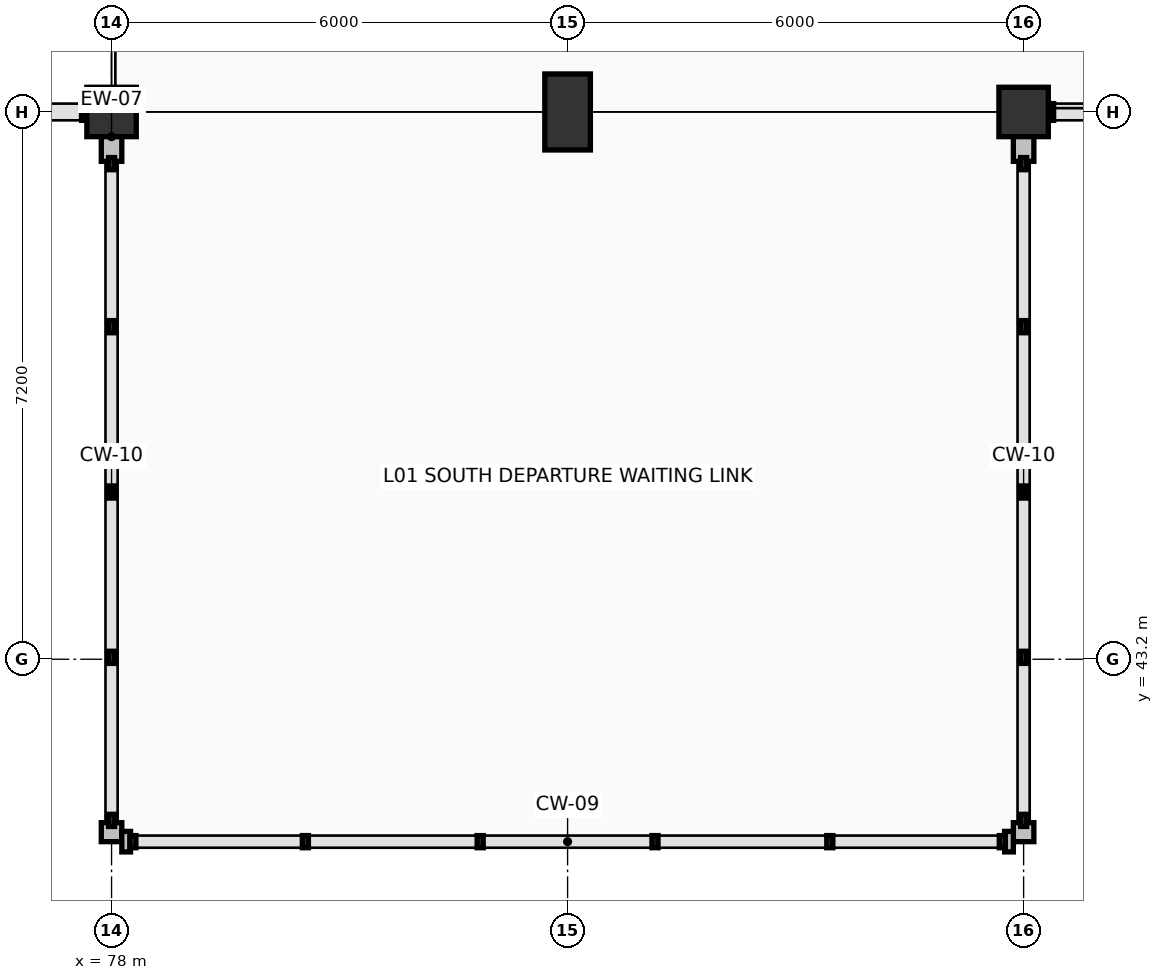
"""IFC4 building model, lengths in metres.
Left out: names, types, materials, properties, quantities, classifications, styles, units other than length and angle.
Written with IfcOpenShell. Run it as: python <this file> out.ifc"""

import sys

from ifc_helpers import new_model, si_unit, direction, frame, frame_2d, origin, origin_2d, place, context, subcontext, project, spatial, rectangle, extrude, element, save


model = new_model("IFC4")
c1 = context("Model", 3, precision=1e-05, world=origin(), true_north=direction((0.0, 1.0)))
c2 = subcontext(c1, "Body", "Model", "MODEL_VIEW")
j1 = project(units=[si_unit("LENGTHUNIT", "METRE"), si_unit("PLANEANGLEUNIT", "RADIAN")], contexts=[c1])
p1 = place(None, origin())
s1 = spatial("IfcSite", under=j1, at=p1, CompositionType="ELEMENT")
p2 = place(p1, origin())
s2 = spatial("IfcBuilding", under=s1, at=p2, CompositionType="ELEMENT")
p3 = place(p2, frame((0.0, 0.0, 5.76)))
s3 = spatial("IfcBuildingStorey", under=s2, at=p3, CompositionType="ELEMENT", Elevation=5.76)
p4 = place(p3, frame((78.0, 50.4, 0.0), z_axis=(0.0, 0.0, 1.0), x_axis=(1.0, 0.0, 0.0)))
e1 = element("IfcColumn", 1, at=p4, inside=s3, PredefinedType="COLUMN", context=c2, shape_type="SweptSolid", body=[
    extrude(rectangle(XDim=0.65, YDim=0.65, at=origin_2d()), origin(), (0.0, 0.0, 1.0), 5.08),
])
p5 = place(p3, frame((84.0, 50.4, 0.0), z_axis=(0.0, 0.0, 1.0), x_axis=(1.0, 0.0, 0.0)))
e2 = element("IfcColumn", 2, at=p5, inside=s3, PredefinedType="COLUMN", context=c2, shape_type="SweptSolid", body=[
    extrude(rectangle(XDim=0.6, YDim=1.0, at=origin_2d()), origin(), (0.0, 0.0, 1.0), 5.08),
])
p6 = place(p3, frame((90.0, 50.4, 0.0), z_axis=(0.0, 0.0, 1.0), x_axis=(1.0, 0.0, 0.0)))
e3 = element("IfcColumn", 3, at=p6, inside=s3, PredefinedType="COLUMN", context=c2, shape_type="SweptSolid", body=[
    extrude(rectangle(XDim=0.65, YDim=0.65, at=origin_2d()), origin(), (0.0, 0.0, 1.0), 5.08),
])
p7 = place(p3, frame((78.0, 49.75, 0.0), z_axis=(0.0, 0.0, 1.0), x_axis=(0.0, 1.0, 0.0)))
e4 = element("IfcWall", 4, at=p7, inside=s3, PredefinedType="SOLIDWALL", context=c2, shape_type="SweptSolid", body=[
    extrude(rectangle(XDim=0.65, YDim=0.27, at=frame_2d((0.325, 0.0))), origin(), (0.0, 0.0, 1.0), 3.44),
])
p8 = place(p3, frame((78.0, 40.8, 0.0), z_axis=(0.0, 0.0, 1.0), x_axis=(0.0, 1.0, 0.0)))
e5 = element("IfcWall", 5, at=p8, inside=s3, PredefinedType="SOLIDWALL", context=c2, shape_type="SweptSolid", body=[
    extrude(rectangle(XDim=0.25, YDim=0.27, at=frame_2d((0.125, 0.0))), origin(), (0.0, 0.0, 1.0), 3.44),
])
p9 = place(p3, frame((90.0, 49.75, 0.0), z_axis=(0.0, 0.0, 1.0), x_axis=(0.0, 1.0, 0.0)))
e6 = element("IfcWall", 6, at=p9, inside=s3, PredefinedType="SOLIDWALL", context=c2, shape_type="SweptSolid", body=[
    extrude(rectangle(XDim=0.65, YDim=0.27, at=frame_2d((0.325, 0.0))), origin(), (0.0, 0.0, 1.0), 3.44),
])
p10 = place(p3, frame((90.0, 40.8, 0.0), z_axis=(0.0, 0.0, 1.0), x_axis=(0.0, 1.0, 0.0)))
e7 = element("IfcWall", 7, at=p10, inside=s3, PredefinedType="SOLIDWALL", context=c2, shape_type="SweptSolid", body=[
    extrude(rectangle(XDim=0.25, YDim=0.27, at=frame_2d((0.125, 0.0))), origin(), (0.0, 0.0, 1.0), 3.44),
])
for number, where, z_axis, x_axis in (
    (8, (78.135, 40.8, 0.0), (0.0, 0.0, 1.0), (1.0, 0.0, 0.0)),
    (9, (89.75, 40.8, 0.0), (0.0, 0.0, 1.0), (1.0, 0.0, 0.0)),
):
    element("IfcWall", number, at=place(p3, frame(where, z_axis=z_axis, x_axis=x_axis)), inside=s3, PredefinedType="SOLIDWALL", context=c2, shape_type="SweptSolid", body=[
        extrude(rectangle(XDim=0.115, YDim=0.27, at=frame_2d((0.058, 0.0))), origin(), (0.0, 0.0, 1.0), 3.44),
    ])
save(model, sys.argv[1])
